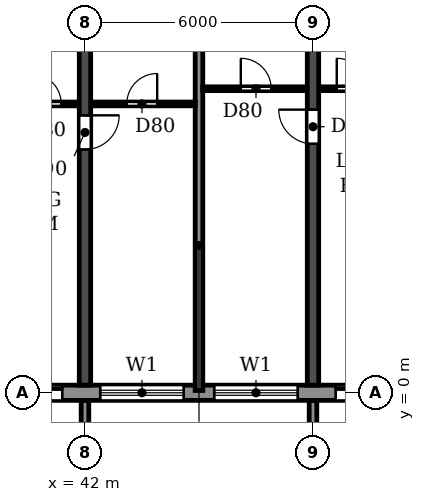
"""IFC4 building model, lengths in metres.
Left out: names, types, materials, properties, quantities, classifications, styles, units other than length and angle.
Written with IfcOpenShell. Run it as: python <this file> out.ifc"""

import sys

from ifc_helpers import new_model, si_unit, direction, frame, frame_2d, origin, place, context, subcontext, project, spatial, polyline, rectangle, outline, extrude, source, transform, mapped, element, fill, save


model = new_model("IFC4")
c1 = context("Model", 3, precision=1e-05, world=origin(), true_north=direction((0.0, 1.0)))
c2 = subcontext(c1, "Body", "Model", "MODEL_VIEW")
j1 = project(units=[si_unit("LENGTHUNIT", "METRE"), si_unit("PLANEANGLEUNIT", "RADIAN")], contexts=[c1])
p1 = place(None, origin())
s1 = spatial("IfcSite", under=j1, at=p1, CompositionType="ELEMENT")
p2 = place(p1, origin())
s2 = spatial("IfcBuilding", under=s1, at=p2, CompositionType="ELEMENT")
p3 = place(p2, frame((0.0, 0.0, 152.1)))
s3 = spatial("IfcBuildingStorey", under=s2, at=p3, CompositionType="ELEMENT", Elevation=152.1)
p4 = place(p3, frame((42.0, 0.2, 0.0), z_axis=(0.0, 0.0, 1.0), x_axis=(0.0, 1.0, 0.0)))
e1 = element("IfcWall", 1, at=p4, inside=s3, PredefinedType="SHEAR", context=c2, shape_type="SweptSolid", body=[
    extrude(rectangle(XDim=11.675, YDim=0.3, at=frame_2d((5.837, 0.0))), origin(), (0.0, 0.0, 1.0), 3.07),
])
p5 = place(p4, frame((6.2, 0.0, 0.0)))
e2 = element("IfcOpeningElement", 2, at=p5, cuts=e1, PredefinedType="OPENING", context=c2, shape_type="SweptSolid", body=[
    extrude(rectangle(XDim=0.9, YDim=2.1, at=frame_2d((0.45, 1.05))), frame((0.0, 0.16, 0.0), z_axis=(0.0, -1.0, 0.0), x_axis=(1.0, 0.0, 0.0)), (0.0, 0.0, 1.0), 0.32),
])
p6 = place(p3, frame((48.0, 0.2, 0.0), z_axis=(0.0, 0.0, 1.0), x_axis=(0.0, 1.0, 0.0)))
e3 = element("IfcWall", 3, at=p6, inside=s3, PredefinedType="SHEAR", context=c2, shape_type="SweptSolid", body=[
    extrude(rectangle(XDim=11.675, YDim=0.3, at=frame_2d((5.837, 0.0))), origin(), (0.0, 0.0, 1.0), 3.07),
])
p7 = place(p6, frame((6.35, 0.0, 0.0)))
e4 = element("IfcOpeningElement", 4, at=p7, cuts=e3, PredefinedType="OPENING", context=c2, shape_type="SweptSolid", body=[
    extrude(rectangle(XDim=0.9, YDim=2.1, at=frame_2d((0.45, 1.05))), frame((0.0, 0.16, 0.0), z_axis=(0.0, -1.0, 0.0), x_axis=(1.0, 0.0, 0.0)), (0.0, 0.0, 1.0), 0.32),
])
p8 = place(p3, frame((16.683, 0.0, 0.0), z_axis=(0.0, 0.0, 1.0), x_axis=(1.0, 0.0, 0.0)))
e5 = element("IfcWall", 5, at=p8, inside=s3, PredefinedType="STANDARD", context=c2, shape_type="SweptSolid", body=[
    extrude(rectangle(XDim=68.634, YDim=0.4, at=frame_2d((34.317, 0.0))), origin(), (0.0, 0.0, 1.0), 3.07),
])
p9 = place(p8, frame((1.717, 0.0, 0.9)))
e6 = element("IfcOpeningElement", 6, at=p9, cuts=e5, PredefinedType="OPENING", context=c2, shape_type="SweptSolid", body=[
    extrude(rectangle(XDim=2.2, YDim=1.5, at=frame_2d((1.1, 0.75))), frame((0.0, 0.21, 0.0), z_axis=(0.0, -1.0, 0.0), x_axis=(1.0, 0.0, 0.0)), (0.0, 0.0, 1.0), 0.42),
])
p10 = place(p8, frame((4.717, 0.0, 0.9)))
e7 = element("IfcOpeningElement", 7, at=p10, cuts=e5, PredefinedType="OPENING", context=c2, shape_type="SweptSolid", body=[
    extrude(rectangle(XDim=2.2, YDim=1.5, at=frame_2d((1.1, 0.75))), frame((0.0, 0.21, 0.0), z_axis=(0.0, -1.0, 0.0), x_axis=(1.0, 0.0, 0.0)), (0.0, 0.0, 1.0), 0.42),
])
p11 = place(p8, frame((7.917, 0.0, 0.0)))
e8 = element("IfcOpeningElement", 8, at=p11, cuts=e5, PredefinedType="OPENING", context=c2, shape_type="SweptSolid", body=[
    extrude(rectangle(XDim=1.8, YDim=2.4, at=frame_2d((0.9, 1.2))), frame((0.0, 0.21, 0.0), z_axis=(0.0, -1.0, 0.0), x_axis=(1.0, 0.0, 0.0)), (0.0, 0.0, 1.0), 0.42),
])
p12 = place(p8, frame((10.717, 0.0, 0.9)))
e9 = element("IfcOpeningElement", 9, at=p12, cuts=e5, PredefinedType="OPENING", context=c2, shape_type="SweptSolid", body=[
    extrude(rectangle(XDim=2.2, YDim=1.5, at=frame_2d((1.1, 0.75))), frame((0.0, 0.21, 0.0), z_axis=(0.0, -1.0, 0.0), x_axis=(1.0, 0.0, 0.0)), (0.0, 0.0, 1.0), 0.42),
])
p13 = place(p8, frame((13.717, 0.0, 0.9)))
e10 = element("IfcOpeningElement", 10, at=p13, cuts=e5, PredefinedType="OPENING", context=c2, shape_type="SweptSolid", body=[
    extrude(rectangle(XDim=2.2, YDim=1.5, at=frame_2d((1.1, 0.75))), frame((0.0, 0.21, 0.0), z_axis=(0.0, -1.0, 0.0), x_axis=(1.0, 0.0, 0.0)), (0.0, 0.0, 1.0), 0.42),
])
p14 = place(p8, frame((16.717, 0.0, 0.9)))
e11 = element("IfcOpeningElement", 11, at=p14, cuts=e5, PredefinedType="OPENING", context=c2, shape_type="SweptSolid", body=[
    extrude(rectangle(XDim=2.2, YDim=1.5, at=frame_2d((1.1, 0.75))), frame((0.0, 0.21, 0.0), z_axis=(0.0, -1.0, 0.0), x_axis=(1.0, 0.0, 0.0)), (0.0, 0.0, 1.0), 0.42),
])
p15 = place(p8, frame((19.717, 0.0, 0.9)))
e12 = element("IfcOpeningElement", 12, at=p15, cuts=e5, PredefinedType="OPENING", context=c2, shape_type="SweptSolid", body=[
    extrude(rectangle(XDim=2.2, YDim=1.5, at=frame_2d((1.1, 0.75))), frame((0.0, 0.21, 0.0), z_axis=(0.0, -1.0, 0.0), x_axis=(1.0, 0.0, 0.0)), (0.0, 0.0, 1.0), 0.42),
])
p16 = place(p8, frame((22.917, 0.0, 0.0)))
e13 = element("IfcOpeningElement", 13, at=p16, cuts=e5, PredefinedType="OPENING", context=c2, shape_type="SweptSolid", body=[
    extrude(rectangle(XDim=1.8, YDim=2.4, at=frame_2d((0.9, 1.2))), frame((0.0, 0.21, 0.0), z_axis=(0.0, -1.0, 0.0), x_axis=(1.0, 0.0, 0.0)), (0.0, 0.0, 1.0), 0.42),
])
p17 = place(p8, frame((25.717, 0.0, 0.9)))
e14 = element("IfcOpeningElement", 14, at=p17, cuts=e5, PredefinedType="OPENING", context=c2, shape_type="SweptSolid", body=[
    extrude(rectangle(XDim=2.2, YDim=1.5, at=frame_2d((1.1, 0.75))), frame((0.0, 0.21, 0.0), z_axis=(0.0, -1.0, 0.0), x_axis=(1.0, 0.0, 0.0)), (0.0, 0.0, 1.0), 0.42),
])
p18 = place(p8, frame((28.717, 0.0, 0.9)))
e15 = element("IfcOpeningElement", 15, at=p18, cuts=e5, PredefinedType="OPENING", context=c2, shape_type="SweptSolid", body=[
    extrude(rectangle(XDim=2.2, YDim=1.5, at=frame_2d((1.1, 0.75))), frame((0.0, 0.21, 0.0), z_axis=(0.0, -1.0, 0.0), x_axis=(1.0, 0.0, 0.0)), (0.0, 0.0, 1.0), 0.42),
])
p19 = place(p8, frame((31.917, 0.0, 0.0)))
e16 = element("IfcOpeningElement", 16, at=p19, cuts=e5, PredefinedType="OPENING", context=c2, shape_type="SweptSolid", body=[
    extrude(rectangle(XDim=1.8, YDim=2.4, at=frame_2d((0.9, 1.2))), frame((0.0, 0.21, 0.0), z_axis=(0.0, -1.0, 0.0), x_axis=(1.0, 0.0, 0.0)), (0.0, 0.0, 1.0), 0.42),
])
p20 = place(p8, frame((34.717, 0.0, 0.9)))
e17 = element("IfcOpeningElement", 17, at=p20, cuts=e5, PredefinedType="OPENING", context=c2, shape_type="SweptSolid", body=[
    extrude(rectangle(XDim=2.2, YDim=1.5, at=frame_2d((1.1, 0.75))), frame((0.0, 0.21, 0.0), z_axis=(0.0, -1.0, 0.0), x_axis=(1.0, 0.0, 0.0)), (0.0, 0.0, 1.0), 0.42),
])
p21 = place(p8, frame((37.717, 0.0, 0.9)))
e18 = element("IfcOpeningElement", 18, at=p21, cuts=e5, PredefinedType="OPENING", context=c2, shape_type="SweptSolid", body=[
    extrude(rectangle(XDim=2.2, YDim=1.5, at=frame_2d((1.1, 0.75))), frame((0.0, 0.21, 0.0), z_axis=(0.0, -1.0, 0.0), x_axis=(1.0, 0.0, 0.0)), (0.0, 0.0, 1.0), 0.42),
])
p22 = place(p8, frame((40.717, 0.0, 0.9)))
e19 = element("IfcOpeningElement", 19, at=p22, cuts=e5, PredefinedType="OPENING", context=c2, shape_type="SweptSolid", body=[
    extrude(rectangle(XDim=2.2, YDim=1.5, at=frame_2d((1.1, 0.75))), frame((0.0, 0.21, 0.0), z_axis=(0.0, -1.0, 0.0), x_axis=(1.0, 0.0, 0.0)), (0.0, 0.0, 1.0), 0.42),
])
p23 = place(p8, frame((43.717, 0.0, 0.9)))
e20 = element("IfcOpeningElement", 20, at=p23, cuts=e5, PredefinedType="OPENING", context=c2, shape_type="SweptSolid", body=[
    extrude(rectangle(XDim=2.2, YDim=1.5, at=frame_2d((1.1, 0.75))), frame((0.0, 0.21, 0.0), z_axis=(0.0, -1.0, 0.0), x_axis=(1.0, 0.0, 0.0)), (0.0, 0.0, 1.0), 0.42),
])
p24 = place(p8, frame((46.917, 0.0, 0.0)))
e21 = element("IfcOpeningElement", 21, at=p24, cuts=e5, PredefinedType="OPENING", context=c2, shape_type="SweptSolid", body=[
    extrude(rectangle(XDim=1.8, YDim=2.4, at=frame_2d((0.9, 1.2))), frame((0.0, 0.21, 0.0), z_axis=(0.0, -1.0, 0.0), x_axis=(1.0, 0.0, 0.0)), (0.0, 0.0, 1.0), 0.42),
])
p25 = place(p8, frame((49.717, 0.0, 0.9)))
e22 = element("IfcOpeningElement", 22, at=p25, cuts=e5, PredefinedType="OPENING", context=c2, shape_type="SweptSolid", body=[
    extrude(rectangle(XDim=2.2, YDim=1.5, at=frame_2d((1.1, 0.75))), frame((0.0, 0.21, 0.0), z_axis=(0.0, -1.0, 0.0), x_axis=(1.0, 0.0, 0.0)), (0.0, 0.0, 1.0), 0.42),
])
p26 = place(p8, frame((52.717, 0.0, 0.9)))
e23 = element("IfcOpeningElement", 23, at=p26, cuts=e5, PredefinedType="OPENING", context=c2, shape_type="SweptSolid", body=[
    extrude(rectangle(XDim=2.2, YDim=1.5, at=frame_2d((1.1, 0.75))), frame((0.0, 0.21, 0.0), z_axis=(0.0, -1.0, 0.0), x_axis=(1.0, 0.0, 0.0)), (0.0, 0.0, 1.0), 0.42),
])
p27 = place(p8, frame((55.717, 0.0, 0.9)))
e24 = element("IfcOpeningElement", 24, at=p27, cuts=e5, PredefinedType="OPENING", context=c2, shape_type="SweptSolid", body=[
    extrude(rectangle(XDim=2.2, YDim=1.5, at=frame_2d((1.1, 0.75))), frame((0.0, 0.21, 0.0), z_axis=(0.0, -1.0, 0.0), x_axis=(1.0, 0.0, 0.0)), (0.0, 0.0, 1.0), 0.42),
])
p28 = place(p8, frame((58.917, 0.0, 0.0)))
e25 = element("IfcOpeningElement", 25, at=p28, cuts=e5, PredefinedType="OPENING", context=c2, shape_type="SweptSolid", body=[
    extrude(rectangle(XDim=1.8, YDim=2.4, at=frame_2d((0.9, 1.2))), frame((0.0, 0.21, 0.0), z_axis=(0.0, -1.0, 0.0), x_axis=(1.0, 0.0, 0.0)), (0.0, 0.0, 1.0), 0.42),
])
p29 = place(p8, frame((61.717, 0.0, 0.9)))
e26 = element("IfcOpeningElement", 26, at=p29, cuts=e5, PredefinedType="OPENING", context=c2, shape_type="SweptSolid", body=[
    extrude(rectangle(XDim=2.2, YDim=1.5, at=frame_2d((1.1, 0.75))), frame((0.0, 0.21, 0.0), z_axis=(0.0, -1.0, 0.0), x_axis=(1.0, 0.0, 0.0)), (0.0, 0.0, 1.0), 0.42),
])
p30 = place(p8, frame((64.717, 0.0, 0.9)))
e27 = element("IfcOpeningElement", 27, at=p30, cuts=e5, PredefinedType="OPENING", context=c2, shape_type="SweptSolid", body=[
    extrude(rectangle(XDim=2.2, YDim=1.5, at=frame_2d((1.1, 0.75))), frame((0.0, 0.21, 0.0), z_axis=(0.0, -1.0, 0.0), x_axis=(1.0, 0.0, 0.0)), (0.0, 0.0, 1.0), 0.42),
])
m1 = source(origin(), c2, "Body", "SweptSolid", [
    extrude(outline(polyline([(0.0, 0.0), (0.2, 0.0), (0.2, 1.65), (0.0, 1.65), (0.0, 0.0)])), origin(), (0.0, 0.0, 1.0), 3.1),
])
for number, where in (
    (28, (41.9, -1.85, 0.0)),
    (29, (47.9, -1.85, 0.0)),
):
    element("IfcWall", number, at=place(p3, frame(where)), inside=s3, PredefinedType="STANDARD", context=c2, shape_type="MappedRepresentation", body=[
        mapped(m1, transform((0.0, 0.0, 0.0))),
    ])
p31 = place(p3, frame((45.0, 0.06, 0.0), z_axis=(0.0, 0.0, 1.0), x_axis=(0.0, 1.0, 0.0)))
e30 = element("IfcWall", 30, at=p31, inside=s3, PredefinedType="PARTITIONING", context=c2, shape_type="SweptSolid", body=[
    extrude(rectangle(XDim=11.805, YDim=0.2, at=frame_2d((5.902, 0.0))), origin(), (0.0, 0.0, 1.0), 3.07),
])
p32 = place(p3, frame((39.9, 7.6, 0.0), z_axis=(0.0, 0.0, 1.0), x_axis=(1.0, 0.0, 0.0)))
e31 = element("IfcWall", 31, at=p32, inside=s3, PredefinedType="PARTITIONING", context=c2, shape_type="SweptSolid", body=[
    extrude(rectangle(XDim=1.94, YDim=0.1, at=frame_2d((0.97, 0.0))), origin(), (0.0, 0.0, 1.0), 3.07),
])
p33 = place(p32, frame((0.675, 0.0, 0.0)))
e32 = element("IfcOpeningElement", 32, at=p33, cuts=e31, PredefinedType="OPENING", context=c2, shape_type="SweptSolid", body=[
    extrude(rectangle(XDim=0.8, YDim=2.1, at=frame_2d((0.4, 1.05))), frame((0.0, 0.06, 0.0), z_axis=(0.0, -1.0, 0.0), x_axis=(1.0, 0.0, 0.0)), (0.0, 0.0, 1.0), 0.12),
])
p34 = place(p3, frame((42.16, 7.6, 0.0), z_axis=(0.0, 0.0, 1.0), x_axis=(1.0, 0.0, 0.0)))
e33 = element("IfcWall", 33, at=p34, inside=s3, PredefinedType="PARTITIONING", context=c2, shape_type="SweptSolid", body=[
    extrude(rectangle(XDim=2.74, YDim=0.1, at=frame_2d((1.37, 0.0))), origin(), (0.0, 0.0, 1.0), 3.07),
])
p35 = place(p34, frame((0.94, 0.0, 0.0)))
e34 = element("IfcOpeningElement", 34, at=p35, cuts=e33, PredefinedType="OPENING", context=c2, shape_type="SweptSolid", body=[
    extrude(rectangle(XDim=0.8, YDim=2.1, at=frame_2d((0.4, 1.05))), frame((0.0, 0.06, 0.0), z_axis=(0.0, -1.0, 0.0), x_axis=(1.0, 0.0, 0.0)), (0.0, 0.0, 1.0), 0.12),
])
p36 = place(p3, frame((45.1, 8.0, 0.0), z_axis=(0.0, 0.0, 1.0), x_axis=(1.0, 0.0, 0.0)))
e35 = element("IfcWall", 35, at=p36, inside=s3, PredefinedType="PARTITIONING", context=c2, shape_type="SweptSolid", body=[
    extrude(rectangle(XDim=2.74, YDim=0.1, at=frame_2d((1.37, 0.0))), origin(), (0.0, 0.0, 1.0), 3.07),
])
p37 = place(p36, frame((1.0, 0.0, 0.0)))
e36 = element("IfcOpeningElement", 36, at=p37, cuts=e35, PredefinedType="OPENING", context=c2, shape_type="SweptSolid", body=[
    extrude(rectangle(XDim=0.8, YDim=2.1, at=frame_2d((0.4, 1.05))), frame((0.0, 0.06, 0.0), z_axis=(0.0, -1.0, 0.0), x_axis=(1.0, 0.0, 0.0)), (0.0, 0.0, 1.0), 0.12),
])
p38 = place(p3, frame((48.16, 8.0, 0.0), z_axis=(0.0, 0.0, 1.0), x_axis=(1.0, 0.0, 0.0)))
e37 = element("IfcWall", 37, at=p38, inside=s3, PredefinedType="PARTITIONING", context=c2, shape_type="SweptSolid", body=[
    extrude(rectangle(XDim=1.94, YDim=0.1, at=frame_2d((0.97, 0.0))), origin(), (0.0, 0.0, 1.0), 3.07),
])
p39 = place(p38, frame((0.465, 0.0, 0.0)))
e38 = element("IfcOpeningElement", 38, at=p39, cuts=e37, PredefinedType="OPENING", context=c2, shape_type="SweptSolid", body=[
    extrude(rectangle(XDim=0.8, YDim=2.1, at=frame_2d((0.4, 1.05))), frame((0.0, 0.06, 0.0), z_axis=(0.0, -1.0, 0.0), x_axis=(1.0, 0.0, 0.0)), (0.0, 0.0, 1.0), 0.12),
])
p40 = place(p16, origin())
e39 = element("IfcDoor", 39, at=p40, inside=s3, OperationType="DOUBLE_DOOR_SLIDING", PredefinedType="DOOR", context=c2, shape_type="SweptSolid", body=[
    extrude(rectangle(XDim=1.8, YDim=2.4, at=frame_2d((0.9, 1.2))), frame((0.0, 0.025, 0.0), z_axis=(0.0, -1.0, 0.0), x_axis=(1.0, 0.0, 0.0)), (0.0, 0.0, 1.0), 0.05),
])
fill(e13, e39)
p41 = place(p17, origin())
e40 = element("IfcWindow", 40, at=p41, inside=s3, PartitioningType="DOUBLE_PANEL_HORIZONTAL", PredefinedType="WINDOW", context=c2, shape_type="SweptSolid", body=[
    extrude(rectangle(XDim=2.2, YDim=1.5, at=frame_2d((1.1, 0.75))), frame((0.0, 0.03, 0.0), z_axis=(0.0, -1.0, 0.0), x_axis=(1.0, 0.0, 0.0)), (0.0, 0.0, 1.0), 0.06),
])
fill(e14, e40)
p42 = place(p18, origin())
e41 = element("IfcWindow", 41, at=p42, inside=s3, PartitioningType="DOUBLE_PANEL_HORIZONTAL", PredefinedType="WINDOW", context=c2, shape_type="SweptSolid", body=[
    extrude(rectangle(XDim=2.2, YDim=1.5, at=frame_2d((1.1, 0.75))), frame((0.0, 0.03, 0.0), z_axis=(0.0, -1.0, 0.0), x_axis=(1.0, 0.0, 0.0)), (0.0, 0.0, 1.0), 0.06),
])
fill(e15, e41)
p43 = place(p19, origin())
e42 = element("IfcDoor", 42, at=p43, inside=s3, OperationType="DOUBLE_DOOR_SLIDING", PredefinedType="DOOR", context=c2, shape_type="SweptSolid", body=[
    extrude(rectangle(XDim=1.8, YDim=2.4, at=frame_2d((0.9, 1.2))), frame((0.0, 0.025, 0.0), z_axis=(0.0, -1.0, 0.0), x_axis=(1.0, 0.0, 0.0)), (0.0, 0.0, 1.0), 0.05),
])
fill(e16, e42)
p44 = place(p35, origin())
e43 = element("IfcDoor", 43, at=p44, inside=s3, OperationType="SINGLE_SWING_RIGHT", PredefinedType="DOOR", context=c2, shape_type="SweptSolid", body=[
    extrude(rectangle(XDim=0.8, YDim=2.1, at=frame_2d((0.4, 1.05))), frame((0.0, 0.025, 0.0), z_axis=(0.0, -1.0, 0.0), x_axis=(1.0, 0.0, 0.0)), (0.0, 0.0, 1.0), 0.05),
])
fill(e34, e43)
p45 = place(p33, origin())
e44 = element("IfcDoor", 44, at=p45, inside=s3, OperationType="SINGLE_SWING_LEFT", PredefinedType="DOOR", context=c2, shape_type="SweptSolid", body=[
    extrude(rectangle(XDim=0.8, YDim=2.1, at=frame_2d((0.4, 1.05))), frame((0.0, 0.025, 0.0), z_axis=(0.0, -1.0, 0.0), x_axis=(1.0, 0.0, 0.0)), (0.0, 0.0, 1.0), 0.05),
])
fill(e32, e44)
p46 = place(p5, frame((0.9, 0.0, 0.0), z_axis=(0.0, 0.0, 1.0), x_axis=(-1.0, 0.0, 0.0)))
e45 = element("IfcDoor", 45, at=p46, inside=s3, OperationType="SINGLE_SWING_LEFT", PredefinedType="DOOR", context=c2, shape_type="SweptSolid", body=[
    extrude(rectangle(XDim=0.9, YDim=2.1, at=frame_2d((0.45, 1.05))), frame((0.0, 0.025, 0.0), z_axis=(0.0, -1.0, 0.0), x_axis=(1.0, 0.0, 0.0)), (0.0, 0.0, 1.0), 0.05),
])
fill(e2, e45)
p47 = place(p37, origin())
e46 = element("IfcDoor", 46, at=p47, inside=s3, OperationType="SINGLE_SWING_LEFT", PredefinedType="DOOR", context=c2, shape_type="SweptSolid", body=[
    extrude(rectangle(XDim=0.8, YDim=2.1, at=frame_2d((0.4, 1.05))), frame((0.0, 0.025, 0.0), z_axis=(0.0, -1.0, 0.0), x_axis=(1.0, 0.0, 0.0)), (0.0, 0.0, 1.0), 0.05),
])
fill(e36, e46)
p48 = place(p7, origin())
e47 = element("IfcDoor", 47, at=p48, inside=s3, OperationType="SINGLE_SWING_RIGHT", PredefinedType="DOOR", context=c2, shape_type="SweptSolid", body=[
    extrude(rectangle(XDim=0.9, YDim=2.1, at=frame_2d((0.45, 1.05))), frame((0.0, 0.025, 0.0), z_axis=(0.0, -1.0, 0.0), x_axis=(1.0, 0.0, 0.0)), (0.0, 0.0, 1.0), 0.05),
])
fill(e4, e47)
p49 = place(p39, origin())
e48 = element("IfcDoor", 48, at=p49, inside=s3, OperationType="SINGLE_SWING_LEFT", PredefinedType="DOOR", context=c2, shape_type="SweptSolid", body=[
    extrude(rectangle(XDim=0.8, YDim=2.1, at=frame_2d((0.4, 1.05))), frame((0.0, 0.025, 0.0), z_axis=(0.0, -1.0, 0.0), x_axis=(1.0, 0.0, 0.0)), (0.0, 0.0, 1.0), 0.05),
])
fill(e38, e48)
save(model, sys.argv[1])
